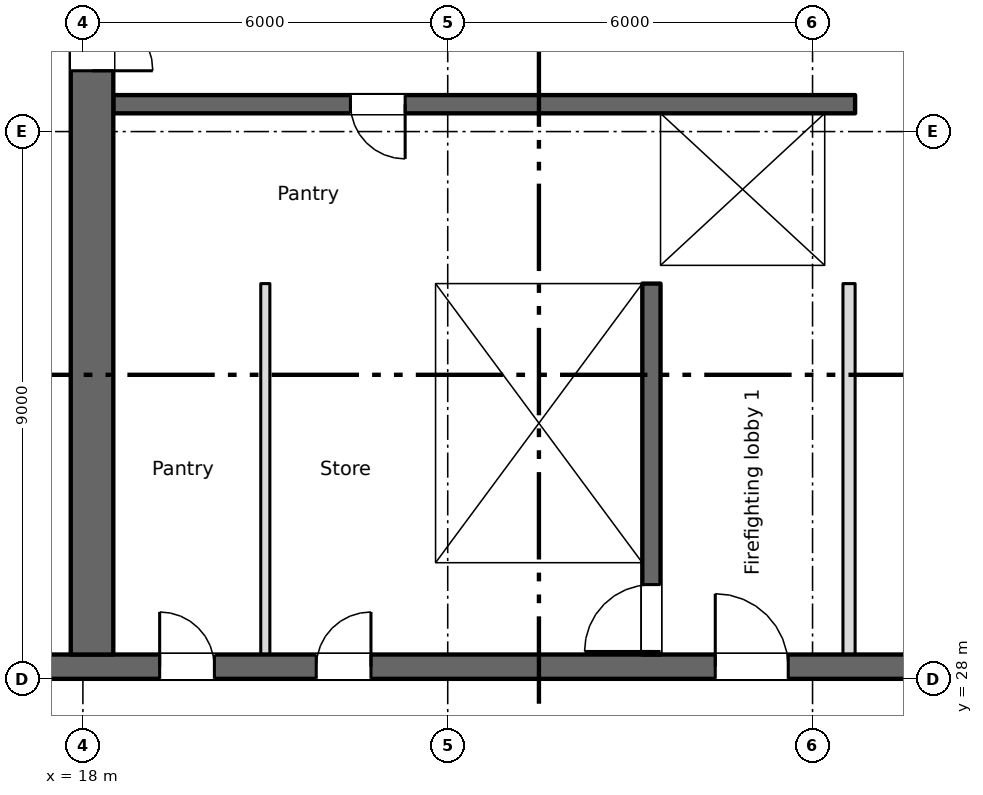
"""IFC4 building model, lengths in metres.
Left out: names, types, materials, properties, quantities, classifications, styles, units other than length and angle.
Written with IfcOpenShell. Run it as: python <this file> out.ifc"""

import sys

from ifc_helpers import new_model, si_unit, direction, frame, frame_2d, origin, place, context, subcontext, project, spatial, rectangle, extrude, element, fill, save


model = new_model("IFC4")
c1 = context("Model", 3, precision=1e-05, world=origin(), true_north=direction((0.0, 1.0)))
c2 = subcontext(c1, "Body", "Model", "MODEL_VIEW")
j1 = project(units=[si_unit("LENGTHUNIT", "METRE"), si_unit("PLANEANGLEUNIT", "RADIAN")], contexts=[c1])
p1 = place(None, origin())
s1 = spatial("IfcSite", under=j1, at=p1, CompositionType="ELEMENT")
p2 = place(p1, origin())
s2 = spatial("IfcBuilding", under=s1, at=p2, CompositionType="ELEMENT")
p3 = place(p2, frame((0.0, 0.0, 211.75)))
s3 = spatial("IfcBuildingStorey", under=s2, at=p3, CompositionType="ELEMENT", Elevation=211.75)
p4 = place(p3, frame((6.6, 28.2, 0.0), z_axis=(0.0, 0.0, 1.0), x_axis=(1.0, 0.0, 0.0)))
e1 = element("IfcWall", 1, at=p4, inside=s3, PredefinedType="SHEAR", context=c2, shape_type="SweptSolid", body=[
    extrude(rectangle(XDim=57.9, YDim=0.4, at=frame_2d((28.95, 0.0))), origin(), (0.0, 0.0, 1.0), 3.35),
])
p5 = place(p4, frame((12.663, 0.0, 0.0)))
e2 = element("IfcOpeningElement", 2, at=p5, cuts=e1, PredefinedType="OPENING", context=c2, shape_type="SweptSolid", body=[
    extrude(rectangle(XDim=0.9, YDim=2.1, at=frame_2d((0.45, 1.05))), frame((0.0, 0.21, 0.0), z_axis=(0.0, -1.0, 0.0), x_axis=(1.0, 0.0, 0.0)), (0.0, 0.0, 1.0), 0.42),
])
p6 = place(p4, frame((15.238, 0.0, 0.0)))
e3 = element("IfcOpeningElement", 3, at=p6, cuts=e1, PredefinedType="OPENING", context=c2, shape_type="SweptSolid", body=[
    extrude(rectangle(XDim=0.9, YDim=2.1, at=frame_2d((0.45, 1.05))), frame((0.0, 0.21, 0.0), z_axis=(0.0, -1.0, 0.0), x_axis=(1.0, 0.0, 0.0)), (0.0, 0.0, 1.0), 0.42),
])
p7 = place(p4, frame((49.95, 0.0, 0.0)))
e4 = element("IfcOpeningElement", 4, at=p7, cuts=e1, PredefinedType="OPENING", context=c2, shape_type="SweptSolid", body=[
    extrude(rectangle(XDim=0.9, YDim=2.1, at=frame_2d((0.45, 1.05))), frame((0.0, 0.21, 0.0), z_axis=(0.0, -1.0, 0.0), x_axis=(1.0, 0.0, 0.0)), (0.0, 0.0, 1.0), 0.42),
])
p8 = place(p4, frame((0.663, 0.0, 0.0)))
e5 = element("IfcOpeningElement", 5, at=p8, cuts=e1, PredefinedType="OPENING", context=c2, shape_type="SweptSolid", body=[
    extrude(rectangle(XDim=0.9, YDim=2.1, at=frame_2d((0.45, 1.05))), frame((0.0, 0.21, 0.0), z_axis=(0.0, -1.0, 0.0), x_axis=(1.0, 0.0, 0.0)), (0.0, 0.0, 1.0), 0.42),
])
p9 = place(p4, frame((2.238, 0.0, 0.0)))
e6 = element("IfcOpeningElement", 6, at=p9, cuts=e1, PredefinedType="OPENING", context=c2, shape_type="SweptSolid", body=[
    extrude(rectangle(XDim=0.9, YDim=2.1, at=frame_2d((0.45, 1.05))), frame((0.0, 0.21, 0.0), z_axis=(0.0, -1.0, 0.0), x_axis=(1.0, 0.0, 0.0)), (0.0, 0.0, 1.0), 0.42),
])
p10 = place(p4, frame((4.8, 0.0, 0.0)))
e7 = element("IfcOpeningElement", 7, at=p10, cuts=e1, PredefinedType="OPENING", context=c2, shape_type="SweptSolid", body=[
    extrude(rectangle(XDim=1.2, YDim=2.1, at=frame_2d((0.6, 1.05))), frame((0.0, 0.21, 0.0), z_axis=(0.0, -1.0, 0.0), x_axis=(1.0, 0.0, 0.0)), (0.0, 0.0, 1.0), 0.42),
])
p11 = place(p4, frame((31.8, 0.0, 0.0)))
e8 = element("IfcOpeningElement", 8, at=p11, cuts=e1, PredefinedType="OPENING", context=c2, shape_type="SweptSolid", body=[
    extrude(rectangle(XDim=1.2, YDim=2.1, at=frame_2d((0.6, 1.05))), frame((0.0, 0.21, 0.0), z_axis=(0.0, -1.0, 0.0), x_axis=(1.0, 0.0, 0.0)), (0.0, 0.0, 1.0), 0.42),
])
p12 = place(p4, frame((55.3, 0.0, 0.0)))
e9 = element("IfcOpeningElement", 9, at=p12, cuts=e1, PredefinedType="OPENING", context=c2, shape_type="SweptSolid", body=[
    extrude(rectangle(XDim=1.2, YDim=2.1, at=frame_2d((0.6, 1.05))), frame((0.0, 0.21, 0.0), z_axis=(0.0, -1.0, 0.0), x_axis=(1.0, 0.0, 0.0)), (0.0, 0.0, 1.0), 0.42),
])
p13 = place(p4, frame((21.8, 0.0, 0.0)))
e10 = element("IfcOpeningElement", 10, at=p13, cuts=e1, PredefinedType="OPENING", context=c2, shape_type="SweptSolid", body=[
    extrude(rectangle(XDim=1.2, YDim=2.1, at=frame_2d((0.6, 1.05))), frame((0.0, 0.21, 0.0), z_axis=(0.0, -1.0, 0.0), x_axis=(1.0, 0.0, 0.0)), (0.0, 0.0, 1.0), 0.42),
])
p14 = place(p4, frame((41.8, 0.0, 0.0)))
e11 = element("IfcOpeningElement", 11, at=p14, cuts=e1, PredefinedType="OPENING", context=c2, shape_type="SweptSolid", body=[
    extrude(rectangle(XDim=1.2, YDim=2.1, at=frame_2d((0.6, 1.05))), frame((0.0, 0.21, 0.0), z_axis=(0.0, -1.0, 0.0), x_axis=(1.0, 0.0, 0.0)), (0.0, 0.0, 1.0), 0.42),
])
p15 = place(p4, frame((24.95, 0.0, 0.0)))
e12 = element("IfcOpeningElement", 12, at=p15, cuts=e1, PredefinedType="OPENING", context=c2, shape_type="SweptSolid", body=[
    extrude(rectangle(XDim=2.4, YDim=2.1, at=frame_2d((1.2, 1.05))), frame((0.0, 0.21, 0.0), z_axis=(0.0, -1.0, 0.0), x_axis=(1.0, 0.0, 0.0)), (0.0, 0.0, 1.0), 0.42),
])
p16 = place(p4, frame((37.45, 0.0, 0.0)))
e13 = element("IfcOpeningElement", 13, at=p16, cuts=e1, PredefinedType="OPENING", context=c2, shape_type="SweptSolid", body=[
    extrude(rectangle(XDim=2.4, YDim=2.1, at=frame_2d((1.2, 1.05))), frame((0.0, 0.21, 0.0), z_axis=(0.0, -1.0, 0.0), x_axis=(1.0, 0.0, 0.0)), (0.0, 0.0, 1.0), 0.42),
])
p17 = place(p4, frame((8.1, 0.0, 0.0)))
e14 = element("IfcOpeningElement", 14, at=p17, cuts=e1, PredefinedType="OPENING", context=c2, shape_type="SweptSolid", body=[
    extrude(rectangle(XDim=2.4, YDim=2.1, at=frame_2d((1.2, 1.05))), frame((0.0, 0.21, 0.0), z_axis=(0.0, -1.0, 0.0), x_axis=(1.0, 0.0, 0.0)), (0.0, 0.0, 1.0), 0.42),
])
p18 = place(p4, frame((28.95, 0.0, 0.0)))
e15 = element("IfcOpeningElement", 15, at=p18, cuts=e1, PredefinedType="OPENING", context=c2, shape_type="SweptSolid", body=[
    extrude(rectangle(XDim=0.9, YDim=2.1, at=frame_2d((0.45, 1.05))), frame((0.0, 0.21, 0.0), z_axis=(0.0, -1.0, 0.0), x_axis=(1.0, 0.0, 0.0)), (0.0, 0.0, 1.0), 0.42),
])
p19 = place(p4, frame((34.95, 0.0, 0.0)))
e16 = element("IfcOpeningElement", 16, at=p19, cuts=e1, PredefinedType="OPENING", context=c2, shape_type="SweptSolid", body=[
    extrude(rectangle(XDim=0.9, YDim=2.1, at=frame_2d((0.45, 1.05))), frame((0.0, 0.21, 0.0), z_axis=(0.0, -1.0, 0.0), x_axis=(1.0, 0.0, 0.0)), (0.0, 0.0, 1.0), 0.42),
])
p20 = place(p3, frame((18.15, 28.4, 0.0), z_axis=(0.0, 0.0, 1.0), x_axis=(0.0, 1.0, 0.0)))
e17 = element("IfcWall", 17, at=p20, inside=s3, PredefinedType="SHEAR", context=c2, shape_type="SweptSolid", body=[
    extrude(rectangle(XDim=16.9, YDim=0.7, at=frame_2d((8.45, 0.0))), origin(), (0.0, 0.0, 1.0), 3.35),
])
p21 = place(p20, frame((9.6, 0.0, 0.0)))
e18 = element("IfcOpeningElement", 18, at=p21, cuts=e17, PredefinedType="OPENING", context=c2, shape_type="SweptSolid", body=[
    extrude(rectangle(XDim=2.0, YDim=2.1, at=frame_2d((1.0, 1.05))), frame((0.0, 0.36, 0.0), z_axis=(0.0, -1.0, 0.0), x_axis=(1.0, 0.0, 0.0)), (0.0, 0.0, 1.0), 0.72),
])
p22 = place(p20, frame((15.4, 0.0, 0.0)))
e19 = element("IfcOpeningElement", 19, at=p22, cuts=e17, PredefinedType="OPENING", context=c2, shape_type="SweptSolid", body=[
    extrude(rectangle(XDim=1.2, YDim=2.1, at=frame_2d((0.6, 1.05))), frame((0.0, 0.36, 0.0), z_axis=(0.0, -1.0, 0.0), x_axis=(1.0, 0.0, 0.0)), (0.0, 0.0, 1.0), 0.72),
])
p23 = place(p3, frame((23.65, 28.4, 0.0), z_axis=(0.0, 0.0, 1.0), x_axis=(0.0, 1.0, 0.0)))
e20 = element("IfcWall", 20, at=p23, inside=s3, PredefinedType="SHEAR", context=c2, shape_type="SweptSolid", body=[
    extrude(rectangle(XDim=6.1, YDim=0.3, at=frame_2d((3.05, 0.0))), origin(), (0.0, 0.0, 1.0), 3.35),
])
p24 = place(p3, frame((27.35, 28.4, 0.0), z_axis=(0.0, 0.0, 1.0), x_axis=(0.0, 1.0, 0.0)))
e21 = element("IfcWall", 21, at=p24, inside=s3, PredefinedType="SHEAR", context=c2, shape_type="SweptSolid", body=[
    extrude(rectangle(XDim=6.1, YDim=0.3, at=frame_2d((3.05, 0.0))), origin(), (0.0, 0.0, 1.0), 3.35),
])
p25 = place(p24, frame((0.05, 0.0, 0.0)))
e22 = element("IfcOpeningElement", 22, at=p25, cuts=e21, PredefinedType="OPENING", context=c2, shape_type="SweptSolid", body=[
    extrude(rectangle(XDim=1.1, YDim=2.1, at=frame_2d((0.55, 1.05))), frame((0.0, 0.16, 0.0), z_axis=(0.0, -1.0, 0.0), x_axis=(1.0, 0.0, 0.0)), (0.0, 0.0, 1.0), 0.32),
])
p26 = place(p3, frame((18.5, 34.65, 0.0), z_axis=(0.0, 0.0, 1.0), x_axis=(1.0, 0.0, 0.0)))
e23 = element("IfcWall", 23, at=p26, inside=s3, PredefinedType="SHEAR", context=c2, shape_type="SweptSolid", body=[
    extrude(rectangle(XDim=12.2, YDim=0.3, at=frame_2d((6.1, 0.0))), origin(), (0.0, 0.0, 1.0), 3.35),
])
p27 = place(p26, frame((9.8, 0.0, 0.0)))
e24 = element("IfcOpeningElement", 24, at=p27, cuts=e23, PredefinedType="OPENING", context=c2, shape_type="SweptSolid", body=[
    extrude(rectangle(XDim=1.1, YDim=2.1, at=frame_2d((0.55, 1.05))), frame((0.0, 0.16, 0.0), z_axis=(0.0, -1.0, 0.0), x_axis=(1.0, 0.0, 0.0)), (0.0, 0.0, 1.0), 0.32),
])
p28 = place(p3, frame((30.7, 37.45, 0.0), z_axis=(0.0, 0.0, 1.0), x_axis=(-1.0, 0.0, 0.0)))
e25 = element("IfcWall", 25, at=p28, inside=s3, PredefinedType="SHEAR", context=c2, shape_type="SweptSolid", body=[
    extrude(rectangle(XDim=12.2, YDim=0.3, at=frame_2d((6.1, 0.0))), origin(), (0.0, 0.0, 1.0), 3.35),
])
p29 = place(p28, frame((7.4, 0.0, 0.0)))
e26 = element("IfcOpeningElement", 26, at=p29, cuts=e25, PredefinedType="OPENING", context=c2, shape_type="SweptSolid", body=[
    extrude(rectangle(XDim=0.9, YDim=2.1, at=frame_2d((0.45, 1.05))), frame((0.0, 0.16, 0.0), z_axis=(0.0, -1.0, 0.0), x_axis=(1.0, 0.0, 0.0)), (0.0, 0.0, 1.0), 0.32),
])
p30 = place(p3, frame((27.35, 34.8, 0.0), z_axis=(0.0, 0.0, 1.0), x_axis=(0.0, 1.0, 0.0)))
e27 = element("IfcWall", 27, at=p30, inside=s3, PredefinedType="SHEAR", context=c2, shape_type="SweptSolid", body=[
    extrude(rectangle(XDim=2.5, YDim=0.3, at=frame_2d((1.25, 0.0))), origin(), (0.0, 0.0, 1.0), 3.35),
])
p31 = place(p3, frame((30.45, 34.8, 0.0), z_axis=(0.0, 0.0, 1.0), x_axis=(0.0, 1.0, 0.0)))
e28 = element("IfcWall", 28, at=p31, inside=s3, PredefinedType="SHEAR", context=c2, shape_type="SweptSolid", body=[
    extrude(rectangle(XDim=2.5, YDim=0.5, at=frame_2d((1.25, 0.0))), origin(), (0.0, 0.0, 1.0), 3.35),
])
p32 = place(p3, frame((30.6, 28.4, 0.0), z_axis=(0.0, 0.0, 1.0), x_axis=(0.0, 1.0, 0.0)))
e29 = element("IfcWall", 29, at=p32, inside=s3, PredefinedType="PARTITIONING", context=c2, shape_type="SweptSolid", body=[
    extrude(rectangle(XDim=6.1, YDim=0.2, at=frame_2d((3.05, 0.0))), origin(), (0.0, 0.0, 1.0), 3.35),
])
p33 = place(p3, frame((21.0, 28.4, 0.0), z_axis=(0.0, 0.0, 1.0), x_axis=(0.0, 1.0, 0.0)))
e30 = element("IfcWall", 30, at=p33, inside=s3, PredefinedType="PARTITIONING", context=c2, shape_type="SweptSolid", body=[
    extrude(rectangle(XDim=6.1, YDim=0.15, at=frame_2d((3.05, 0.0))), origin(), (0.0, 0.0, 1.0), 3.35),
])
p34 = place(p5, origin())
e31 = element("IfcDoor", 31, at=p34, inside=s3, OperationType="SINGLE_SWING_LEFT", PredefinedType="DOOR", context=c2, shape_type="SweptSolid", body=[
    extrude(rectangle(XDim=0.9, YDim=2.1, at=frame_2d((0.45, 1.05))), frame((0.0, 0.025, 0.0), z_axis=(0.0, -1.0, 0.0), x_axis=(1.0, 0.0, 0.0)), (0.0, 0.0, 1.0), 0.05),
])
fill(e2, e31)
p35 = place(p6, origin())
e32 = element("IfcDoor", 32, at=p35, inside=s3, OperationType="SINGLE_SWING_RIGHT", PredefinedType="DOOR", context=c2, shape_type="SweptSolid", body=[
    extrude(rectangle(XDim=0.9, YDim=2.1, at=frame_2d((0.45, 1.05))), frame((0.0, 0.025, 0.0), z_axis=(0.0, -1.0, 0.0), x_axis=(1.0, 0.0, 0.0)), (0.0, 0.0, 1.0), 0.05),
])
fill(e3, e32)
p36 = place(p29, origin())
e33 = element("IfcDoor", 33, at=p36, inside=s3, OperationType="SINGLE_SWING_LEFT", PredefinedType="DOOR", context=c2, shape_type="SweptSolid", body=[
    extrude(rectangle(XDim=0.9, YDim=2.1, at=frame_2d((0.45, 1.05))), frame((0.0, 0.025, 0.0), z_axis=(0.0, -1.0, 0.0), x_axis=(1.0, 0.0, 0.0)), (0.0, 0.0, 1.0), 0.05),
])
fill(e26, e33)
p37 = place(p27, origin())
e34 = element("IfcDoor", 34, at=p37, inside=s3, OperationType="SLIDING_TO_LEFT", PredefinedType="DOOR", context=c2, shape_type="SweptSolid", body=[
    extrude(rectangle(XDim=1.1, YDim=2.1, at=frame_2d((0.55, 1.05))), frame((0.0, 0.025, 0.0), z_axis=(0.0, -1.0, 0.0), x_axis=(1.0, 0.0, 0.0)), (0.0, 0.0, 1.0), 0.05),
])
fill(e24, e34)
p38 = place(p25, origin())
e35 = element("IfcDoor", 35, at=p38, inside=s3, OperationType="SINGLE_SWING_LEFT", PredefinedType="DOOR", context=c2, shape_type="SweptSolid", body=[
    extrude(rectangle(XDim=1.1, YDim=2.1, at=frame_2d((0.55, 1.05))), frame((0.0, 0.025, 0.0), z_axis=(0.0, -1.0, 0.0), x_axis=(1.0, 0.0, 0.0)), (0.0, 0.0, 1.0), 0.05),
])
fill(e22, e35)
p39 = place(p13, origin())
e36 = element("IfcDoor", 36, at=p39, inside=s3, OperationType="SINGLE_SWING_LEFT", PredefinedType="DOOR", context=c2, shape_type="SweptSolid", body=[
    extrude(rectangle(XDim=1.2, YDim=2.1, at=frame_2d((0.6, 1.05))), frame((0.0, 0.025, 0.0), z_axis=(0.0, -1.0, 0.0), x_axis=(1.0, 0.0, 0.0)), (0.0, 0.0, 1.0), 0.05),
])
fill(e10, e36)
p40 = place(p21, origin())
e37 = element("IfcDoor", 37, at=p40, inside=s3, OperationType="DOUBLE_DOOR_SINGLE_SWING", PredefinedType="DOOR", context=c2, shape_type="SweptSolid", body=[
    extrude(rectangle(XDim=2.0, YDim=2.1, at=frame_2d((1.0, 1.05))), frame((0.0, 0.025, 0.0), z_axis=(0.0, -1.0, 0.0), x_axis=(1.0, 0.0, 0.0)), (0.0, 0.0, 1.0), 0.05),
])
fill(e18, e37)
save(model, sys.argv[1])
